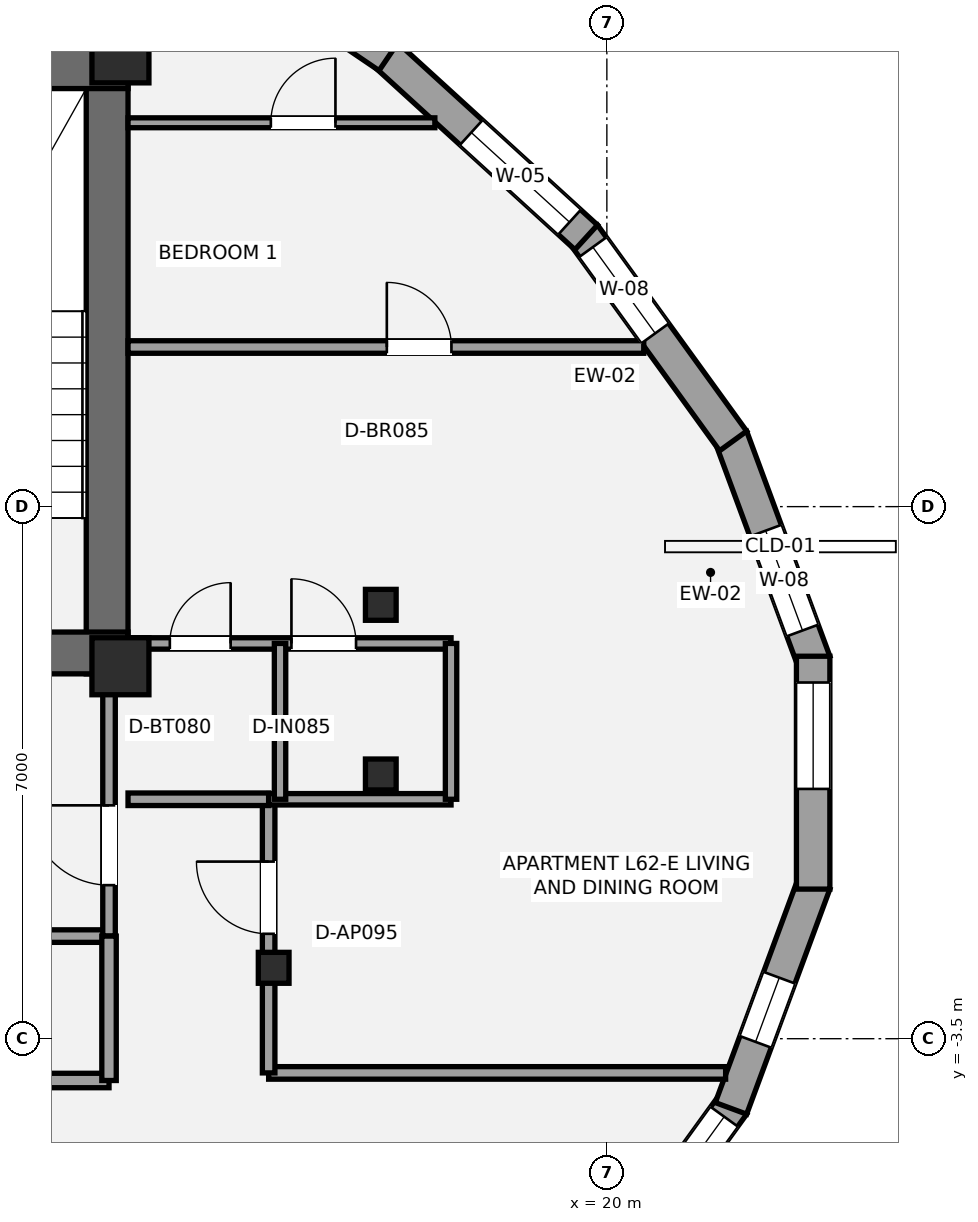
"""IFC4 building model, lengths in metres.
Left out: names, types, materials, properties, quantities, classifications, styles, units other than length and angle.
Written with IfcOpenShell. Run it as: python <this file> out.ifc"""

import sys

from ifc_helpers import new_model, si_unit, direction, frame, frame_2d, origin, origin_2d, place, context, subcontext, project, spatial, rectangle, i_section, extrude, element, fill, save


model = new_model("IFC4")
c1 = context("Model", 3, precision=1e-05, world=origin(), true_north=direction((0.0, 1.0)))
c2 = subcontext(c1, "Body", "Model", "MODEL_VIEW")
j1 = project(units=[si_unit("LENGTHUNIT", "METRE"), si_unit("PLANEANGLEUNIT", "RADIAN")], contexts=[c1])
p1 = place(None, origin())
s1 = spatial("IfcSite", under=j1, at=p1, CompositionType="ELEMENT")
p2 = place(p1, origin())
s2 = spatial("IfcBuilding", under=s1, at=p2, CompositionType="ELEMENT")
p3 = place(p2, frame((0.0, 0.0, 222.6)))
s3 = spatial("IfcBuildingStorey", under=s2, at=p3, CompositionType="ELEMENT", Elevation=222.6)
p4 = place(p3, frame((13.425, 1.3, 0.0), z_axis=(0.0, 0.0, 1.0), x_axis=(0.0, 1.0, 0.0)))
e1 = element("IfcWall", 1, at=p4, inside=s3, PredefinedType="SHEAR", context=c2, shape_type="SweptSolid", body=[
    extrude(rectangle(XDim=8.25, YDim=0.55, at=frame_2d((4.125, 0.0))), origin(), (0.0, 0.0, 1.0), 3.15),
])
p5 = place(p3, frame((4.525, 9.275, 0.0), z_axis=(0.0, 0.0, 1.0), x_axis=(1.0, 0.0, 0.0)))
e2 = element("IfcWall", 2, at=p5, inside=s3, PredefinedType="SHEAR", context=c2, shape_type="SweptSolid", body=[
    extrude(rectangle(XDim=9.175, YDim=0.55, at=frame_2d((4.587, 0.0))), origin(), (0.0, 0.0, 1.0), 3.15),
])
p6 = place(p3, frame((13.7, 1.575, 0.0), z_axis=(0.0, 0.0, 1.0), x_axis=(-1.0, 0.0, 0.0)))
e3 = element("IfcWall", 3, at=p6, inside=s3, PredefinedType="SHEAR", context=c2, shape_type="SweptSolid", body=[
    extrude(rectangle(XDim=8.775, YDim=0.55, at=frame_2d((4.387, 0.0))), origin(), (0.0, 0.0, 1.0), 3.15),
])
p7 = place(p6, frame((2.35, 0.0, 0.0)))
e4 = element("IfcOpeningElement", 4, at=p7, cuts=e3, PredefinedType="OPENING", context=c2, shape_type="SweptSolid", body=[
    extrude(rectangle(XDim=1.05, YDim=2.15, at=frame_2d((0.525, 1.075))), frame((0.0, 0.285, 0.0), z_axis=(0.0, -1.0, 0.0), x_axis=(1.0, 0.0, 0.0)), (0.0, 0.0, 1.0), 0.57),
])
p8 = place(p6, frame((4.35, 0.0, 0.0)))
e5 = element("IfcOpeningElement", 5, at=p8, cuts=e3, PredefinedType="OPENING", context=c2, shape_type="SweptSolid", body=[
    extrude(rectangle(XDim=1.1, YDim=2.2, at=frame_2d((0.55, 1.1))), frame((0.0, 0.285, 0.0), z_axis=(0.0, -1.0, 0.0), x_axis=(1.0, 0.0, 0.0)), (0.0, 0.0, 1.0), 0.57),
])
for number, where, z_axis, x_axis in (
    (6, (13.6, 1.4, 0.0), (0.0, 0.0, 1.0), (1.0, 0.0, 0.0)),
    (7, (13.6, 9.45, 0.0), (0.0, 0.0, 1.0), (1.0, 0.0, 0.0)),
):
    element("IfcColumn", number, at=place(p3, frame(where, z_axis=z_axis, x_axis=x_axis)), inside=s3, PredefinedType="PILASTER", context=c2, shape_type="SweptSolid", body=[
        extrude(rectangle(XDim=0.75, YDim=0.75, at=origin_2d()), origin(), (0.0, 0.0, 1.0), 3.15),
    ])
for number, where, z_axis, x_axis in (
    (8, (17.026, 2.208, 0.0), (0.0, 0.0, 1.0), (1.0, 0.0, 0.0)),
    (9, (15.616, -2.567, 0.0), (0.0, 0.0, 1.0), (1.0, 0.0, 0.0)),
    (10, (17.026, -0.024, 0.0), (0.0, 0.0, 1.0), (1.0, 0.0, 0.0)),
):
    element("IfcColumn", number, at=place(p3, frame(where, z_axis=z_axis, x_axis=x_axis)), inside=s3, PredefinedType="COLUMN", context=c2, shape_type="SweptSolid", body=[
        extrude(i_section(OverallWidth=0.404, OverallDepth=0.407, WebThickness=0.027, FlangeThickness=0.044, at=origin_2d()), origin(), (0.0, 0.0, 1.0), 3.15),
    ])
p9 = place(p3, frame((21.633, 4.417, 0.0), z_axis=(0.0, 0.0, 1.0), x_axis=(0.346755155412, -0.937955682426, 0.0)))
e11 = element("IfcWall", 11, at=p9, inside=s3, PredefinedType="STANDARD", context=c2, shape_type="SweptSolid", body=[
    extrude(rectangle(XDim=3.157, YDim=0.44, at=frame_2d((1.579, 0.0))), origin(), (0.0, 0.0, 1.0), 2.336),
])
p10 = place(p9, frame((1.315, 0.0, 0.55)))
e12 = element("IfcOpeningElement", 12, at=p10, cuts=e11, PredefinedType="OPENING", context=c2, shape_type="SweptSolid", body=[
    extrude(rectangle(XDim=1.4, YDim=1.55, at=frame_2d((0.7, 0.775))), frame((0.0, 0.23, 0.0), z_axis=(0.0, -1.0, 0.0), x_axis=(1.0, 0.0, 0.0)), (0.0, 0.0, 1.0), 0.46),
])
p11 = place(p3, frame((19.698, 7.076, 0.0), z_axis=(0.0, 0.0, 1.0), x_axis=(0.586344849721, -0.810061551492, 0.0)))
e13 = element("IfcWall", 13, at=p11, inside=s3, PredefinedType="STANDARD", context=c2, shape_type="SweptSolid", body=[
    extrude(rectangle(XDim=3.348, YDim=0.44, at=frame_2d((1.674, 0.0))), origin(), (0.0, 0.0, 1.0), 2.336),
])
p12 = place(p11, frame((0.2, 0.0, 0.58)))
e14 = element("IfcOpeningElement", 14, at=p12, cuts=e13, PredefinedType="OPENING", context=c2, shape_type="SweptSolid", body=[
    extrude(rectangle(XDim=1.4, YDim=1.55, at=frame_2d((0.7, 0.775))), frame((0.0, 0.23, 0.0), z_axis=(0.0, -1.0, 0.0), x_axis=(1.0, 0.0, 0.0)), (0.0, 0.0, 1.0), 0.46),
])
p13 = place(p3, frame((17.101, 9.438, 0.0), z_axis=(0.0, 0.0, 1.0), x_axis=(0.738907573949, -0.673806795129, 0.0)))
e15 = element("IfcWall", 15, at=p13, inside=s3, PredefinedType="STANDARD", context=c2, shape_type="SweptSolid", body=[
    extrude(rectangle(XDim=3.555, YDim=0.44, at=frame_2d((1.778, 0.0))), origin(), (0.0, 0.0, 1.0), 2.336),
])
p14 = place(p13, frame((1.508, 0.0, 0.55)))
e16 = element("IfcOpeningElement", 16, at=p14, cuts=e15, PredefinedType="OPENING", context=c2, shape_type="SweptSolid", body=[
    extrude(rectangle(XDim=1.75, YDim=1.55, at=frame_2d((0.875, 0.775))), frame((0.0, 0.23, 0.0), z_axis=(0.0, -1.0, 0.0), x_axis=(1.0, 0.0, 0.0)), (0.0, 0.0, 1.0), 0.46),
])
p15 = place(p3, frame((14.033, 11.516, 0.0), z_axis=(0.0, 0.0, 1.0), x_axis=(0.827642668093, -0.561255391023, 0.0)))
e17 = element("IfcWall", 17, at=p15, inside=s3, PredefinedType="STANDARD", context=c2, shape_type="SweptSolid", body=[
    extrude(rectangle(XDim=3.738, YDim=0.44, at=frame_2d((1.869, 0.0))), origin(), (0.0, 0.0, 1.0), 2.336),
])
p16 = place(p15, frame((0.498, 0.0, 0.55)))
e18 = element("IfcOpeningElement", 18, at=p16, cuts=e17, PredefinedType="OPENING", context=c2, shape_type="SweptSolid", body=[
    extrude(rectangle(XDim=1.75, YDim=1.55, at=frame_2d((0.875, 0.775))), frame((0.0, 0.23, 0.0), z_axis=(0.0, -1.0, 0.0), x_axis=(1.0, 0.0, 0.0)), (0.0, 0.0, 1.0), 0.46),
])
p17 = place(p3, frame((21.661, -4.364, 0.0), z_axis=(0.0, 0.0, 1.0), x_axis=(-0.586344849721, -0.810061551492, 0.0)))
e19 = element("IfcWall", 19, at=p17, inside=s3, PredefinedType="STANDARD", context=c2, shape_type="SweptSolid", body=[
    extrude(rectangle(XDim=3.348, YDim=0.44, at=frame_2d((1.674, 0.0))), origin(), (0.0, 0.0, 1.0), 2.336),
])
p18 = place(p17, frame((0.2, 0.0, 0.55)))
e20 = element("IfcOpeningElement", 20, at=p18, cuts=e19, PredefinedType="OPENING", context=c2, shape_type="SweptSolid", body=[
    extrude(rectangle(XDim=1.75, YDim=1.55, at=frame_2d((0.875, 0.775))), frame((0.0, 0.23, 0.0), z_axis=(0.0, -1.0, 0.0), x_axis=(1.0, 0.0, 0.0)), (0.0, 0.0, 1.0), 0.46),
])
p19 = place(p3, frame((22.728, -1.456, 0.0), z_axis=(0.0, 0.0, 1.0), x_axis=(-0.346755155412, -0.937955682426, 0.0)))
e21 = element("IfcWall", 21, at=p19, inside=s3, PredefinedType="STANDARD", context=c2, shape_type="SweptSolid", body=[
    extrude(rectangle(XDim=3.157, YDim=0.44, at=frame_2d((1.579, 0.0))), origin(), (0.0, 0.0, 1.0), 2.336),
])
p20 = place(p19, frame((1.324, 0.0, 0.58)))
e22 = element("IfcOpeningElement", 22, at=p20, cuts=e21, PredefinedType="OPENING", context=c2, shape_type="SweptSolid", body=[
    extrude(rectangle(XDim=0.9, YDim=1.35, at=frame_2d((0.45, 0.675))), frame((0.0, 0.23, 0.0), z_axis=(0.0, -1.0, 0.0), x_axis=(1.0, 0.0, 0.0)), (0.0, 0.0, 1.0), 0.46),
])
p21 = place(p3, frame((22.714, 1.532, 0.0), z_axis=(0.0, 0.0, 1.0), x_axis=(0.0, -1.0, 0.0)))
e23 = element("IfcWall", 23, at=p21, inside=s3, PredefinedType="STANDARD", context=c2, shape_type="SweptSolid", body=[
    extrude(rectangle(XDim=3.064, YDim=0.44, at=frame_2d((1.532, 0.0))), origin(), (0.0, 0.0, 1.0), 2.336),
])
p22 = place(p21, frame((0.346, 0.0, 0.58)))
e24 = element("IfcOpeningElement", 24, at=p22, cuts=e23, PredefinedType="OPENING", context=c2, shape_type="SweptSolid", body=[
    extrude(rectangle(XDim=1.4, YDim=1.55, at=frame_2d((0.7, 0.775))), frame((0.0, 0.23, 0.0), z_axis=(0.0, -1.0, 0.0), x_axis=(1.0, 0.0, 0.0)), (0.0, 0.0, 1.0), 0.46),
])
p23 = place(p3, frame((7.2, -2.15, 0.0), z_axis=(0.0, 0.0, 1.0), x_axis=(1.0, 0.0, 0.0)))
e25 = element("IfcWall", 25, at=p23, inside=s3, PredefinedType="PARTITIONING", context=c2, shape_type="SweptSolid", body=[
    extrude(rectangle(XDim=6.25, YDim=0.165, at=frame_2d((3.125, 0.0))), origin(), (0.0, 0.0, 1.0), 2.97),
])
p24 = place(p3, frame((13.45, -2.15, 0.0), z_axis=(0.0, 0.0, 1.0), x_axis=(0.0, 1.0, 0.0)))
e26 = element("IfcWall", 26, at=p24, inside=s3, PredefinedType="PARTITIONING", context=c2, shape_type="SweptSolid", body=[
    extrude(rectangle(XDim=3.5, YDim=0.165, at=frame_2d((1.75, 0.0))), origin(), (0.0, 0.0, 1.0), 2.423),
])
p25 = place(p24, frame((0.67, 0.0, 0.0)))
e27 = element("IfcOpeningElement", 27, at=p25, cuts=e26, PredefinedType="OPENING", context=c2, shape_type="SweptSolid", body=[
    extrude(rectangle(XDim=1.05, YDim=2.15, at=frame_2d((0.525, 1.075))), frame((0.0, 0.093, 0.0), z_axis=(0.0, -1.0, 0.0), x_axis=(1.0, 0.0, 0.0)), (0.0, 0.0, 1.0), 0.185),
])
p26 = place(p3, frame((2.1, -4.05, 0.0), z_axis=(0.0, 0.0, 1.0), x_axis=(1.0, 0.0, 0.0)))
e28 = element("IfcWall", 28, at=p26, inside=s3, PredefinedType="PLUMBINGWALL", context=c2, shape_type="SweptSolid", body=[
    extrude(rectangle(XDim=11.35, YDim=0.19, at=frame_2d((5.675, 0.0))), origin(), (0.0, 0.0, 1.0), 2.357),
])
p27 = place(p26, frame((5.2, 0.0, 0.0)))
e29 = element("IfcOpeningElement", 29, at=p27, cuts=e28, PredefinedType="OPENING", context=c2, shape_type="SweptSolid", body=[
    extrude(rectangle(XDim=0.9, YDim=2.1, at=frame_2d((0.45, 1.05))), frame((0.0, 0.105, 0.0), z_axis=(0.0, -1.0, 0.0), x_axis=(1.0, 0.0, 0.0)), (0.0, 0.0, 1.0), 0.21),
])
p28 = place(p3, frame((13.45, -4.05, 0.0), z_axis=(0.0, 0.0, 1.0), x_axis=(0.0, 1.0, 0.0)))
e30 = element("IfcWall", 30, at=p28, inside=s3, PredefinedType="PLUMBINGWALL", context=c2, shape_type="SweptSolid", body=[
    extrude(rectangle(XDim=1.9, YDim=0.19, at=frame_2d((0.95, 0.0))), origin(), (0.0, 0.0, 1.0), 2.423),
])
p29 = place(p3, frame((15.55, -3.95, 0.0), z_axis=(0.0, 0.0, 1.0), x_axis=(1.0, 0.0, 0.0)))
e31 = element("IfcWall", 31, at=p29, inside=s3, PredefinedType="PARTITIONING", context=c2, shape_type="SweptSolid", body=[
    extrude(rectangle(XDim=6.012, YDim=0.165, at=frame_2d((3.006, 0.0))), origin(), (0.0, 0.0, 1.0), 2.423),
])
p30 = place(p3, frame((15.55, -3.95, 0.0), z_axis=(0.0, 0.0, 1.0), x_axis=(0.0, 1.0, 0.0)))
e32 = element("IfcWall", 32, at=p30, inside=s3, PredefinedType="PARTITIONING", context=c2, shape_type="SweptSolid", body=[
    extrude(rectangle(XDim=3.6, YDim=0.165, at=frame_2d((1.8, 0.0))), origin(), (0.0, 0.0, 1.0), 2.357),
])
p31 = place(p30, frame((1.83, 0.0, 0.0)))
e33 = element("IfcOpeningElement", 33, at=p31, cuts=e32, PredefinedType="OPENING", context=c2, shape_type="SweptSolid", body=[
    extrude(rectangle(XDim=0.95, YDim=2.15, at=frame_2d((0.475, 1.075))), frame((0.0, 0.093, 0.0), z_axis=(0.0, -1.0, 0.0), x_axis=(1.0, 0.0, 0.0)), (0.0, 0.0, 1.0), 0.185),
])
p32 = place(p3, frame((13.7, -0.35, 0.0), z_axis=(0.0, 0.0, 1.0), x_axis=(1.0, 0.0, 0.0)))
e34 = element("IfcWall", 34, at=p32, inside=s3, PredefinedType="PARTITIONING", context=c2, shape_type="SweptSolid", body=[
    extrude(rectangle(XDim=1.85, YDim=0.165, at=frame_2d((0.925, 0.0))), origin(), (0.0, 0.0, 1.0), 2.423),
])
p33 = place(p3, frame((13.7, 5.6, 0.0), z_axis=(0.0, 0.0, 1.0), x_axis=(1.0, 0.0, 0.0)))
e35 = element("IfcWall", 35, at=p33, inside=s3, PredefinedType="PARTITIONING", context=c2, shape_type="SweptSolid", body=[
    extrude(rectangle(XDim=6.785, YDim=0.165, at=frame_2d((3.393, 0.0))), origin(), (0.0, 0.0, 1.0), 2.423),
])
p34 = place(p33, frame((3.405, 0.0, 0.0)))
e36 = element("IfcOpeningElement", 36, at=p34, cuts=e35, PredefinedType="OPENING", context=c2, shape_type="SweptSolid", body=[
    extrude(rectangle(XDim=0.85, YDim=2.1, at=frame_2d((0.425, 1.05))), frame((0.0, 0.093, 0.0), z_axis=(0.0, -1.0, 0.0), x_axis=(1.0, 0.0, 0.0)), (0.0, 0.0, 1.0), 0.185),
])
p35 = place(p3, frame((13.7, 1.7, 0.0), z_axis=(0.0, 0.0, 1.0), x_axis=(1.0, 0.0, 0.0)))
e37 = element("IfcWall", 37, at=p35, inside=s3, PredefinedType="PLUMBINGWALL", context=c2, shape_type="SweptSolid", body=[
    extrude(rectangle(XDim=4.25, YDim=0.15, at=frame_2d((2.125, 0.0))), origin(), (0.0, 0.0, 1.0), 2.423),
])
p36 = place(p35, frame((0.55, 0.0, 0.0)))
e38 = element("IfcOpeningElement", 38, at=p36, cuts=e37, PredefinedType="OPENING", context=c2, shape_type="SweptSolid", body=[
    extrude(rectangle(XDim=0.8, YDim=2.1, at=frame_2d((0.4, 1.05))), frame((0.0, 0.085, 0.0), z_axis=(0.0, -1.0, 0.0), x_axis=(1.0, 0.0, 0.0)), (0.0, 0.0, 1.0), 0.17),
])
p37 = place(p35, frame((2.15, 0.0, 0.0)))
e39 = element("IfcOpeningElement", 39, at=p37, cuts=e37, PredefinedType="OPENING", context=c2, shape_type="SweptSolid", body=[
    extrude(rectangle(XDim=0.85, YDim=2.1, at=frame_2d((0.425, 1.05))), frame((0.0, 0.085, 0.0), z_axis=(0.0, -1.0, 0.0), x_axis=(1.0, 0.0, 0.0)), (0.0, 0.0, 1.0), 0.17),
])
p38 = place(p3, frame((15.55, -0.35, 0.0), z_axis=(0.0, 0.0, 1.0), x_axis=(1.0, 0.0, 0.0)))
e40 = element("IfcWall", 40, at=p38, inside=s3, PredefinedType="PLUMBINGWALL", context=c2, shape_type="SweptSolid", body=[
    extrude(rectangle(XDim=2.4, YDim=0.15, at=frame_2d((1.2, 0.0))), origin(), (0.0, 0.0, 1.0), 2.423),
])
p39 = place(p3, frame((15.7, -0.35, 0.0), z_axis=(0.0, 0.0, 1.0), x_axis=(0.0, 1.0, 0.0)))
e41 = element("IfcWall", 41, at=p39, inside=s3, PredefinedType="PLUMBINGWALL", context=c2, shape_type="SweptSolid", body=[
    extrude(rectangle(XDim=2.05, YDim=0.15, at=frame_2d((1.025, 0.0))), origin(), (0.0, 0.0, 1.0), 2.97),
])
p40 = place(p3, frame((17.95, -0.35, 0.0), z_axis=(0.0, 0.0, 1.0), x_axis=(0.0, 1.0, 0.0)))
e42 = element("IfcWall", 42, at=p40, inside=s3, PredefinedType="PLUMBINGWALL", context=c2, shape_type="SweptSolid", body=[
    extrude(rectangle(XDim=2.05, YDim=0.15, at=frame_2d((1.025, 0.0))), origin(), (0.0, 0.0, 1.0), 2.423),
])
p41 = place(p3, frame((13.7, 8.55, 0.0), z_axis=(0.0, 0.0, 1.0), x_axis=(1.0, 0.0, 0.0)))
e43 = element("IfcWall", 43, at=p41, inside=s3, PredefinedType="PARTITIONING", context=c2, shape_type="SweptSolid", body=[
    extrude(rectangle(XDim=4.037, YDim=0.13, at=frame_2d((2.019, 0.0))), origin(), (0.0, 0.0, 1.0), 2.423),
])
p42 = place(p41, frame((1.879, 0.0, 0.0)))
e44 = element("IfcOpeningElement", 44, at=p42, cuts=e43, PredefinedType="OPENING", context=c2, shape_type="SweptSolid", body=[
    extrude(rectangle(XDim=0.85, YDim=2.1, at=frame_2d((0.425, 1.05))), frame((0.0, 0.075, 0.0), z_axis=(0.0, -1.0, 0.0), x_axis=(1.0, 0.0, 0.0)), (0.0, 0.0, 1.0), 0.15),
])
p43 = place(p10, origin())
e45 = element("IfcWindow", 45, at=p43, inside=s3, PartitioningType="SINGLE_PANEL", PredefinedType="WINDOW", context=c2, shape_type="SweptSolid", body=[
    extrude(rectangle(XDim=1.4, YDim=1.55, at=frame_2d((0.7, 0.775))), frame((0.0, -0.01, 0.0), z_axis=(0.0, -1.0, 0.0), x_axis=(1.0, 0.0, 0.0)), (0.0, 0.0, 1.0), 0.06),
])
fill(e12, e45)
p44 = place(p12, origin())
e46 = element("IfcWindow", 46, at=p44, inside=s3, PartitioningType="SINGLE_PANEL", PredefinedType="WINDOW", context=c2, shape_type="SweptSolid", body=[
    extrude(rectangle(XDim=1.4, YDim=1.55, at=frame_2d((0.7, 0.775))), frame((0.0, -0.01, 0.0), z_axis=(0.0, -1.0, 0.0), x_axis=(1.0, 0.0, 0.0)), (0.0, 0.0, 1.0), 0.06),
])
fill(e14, e46)
p45 = place(p14, origin())
e47 = element("IfcWindow", 47, at=p45, inside=s3, PartitioningType="SINGLE_PANEL", PredefinedType="WINDOW", context=c2, shape_type="SweptSolid", body=[
    extrude(rectangle(XDim=1.75, YDim=1.55, at=frame_2d((0.875, 0.775))), frame((0.0, -0.01, 0.0), z_axis=(0.0, -1.0, 0.0), x_axis=(1.0, 0.0, 0.0)), (0.0, 0.0, 1.0), 0.06),
])
fill(e16, e47)
p46 = place(p18, origin())
e48 = element("IfcWindow", 48, at=p46, inside=s3, PartitioningType="SINGLE_PANEL", PredefinedType="WINDOW", context=c2, shape_type="SweptSolid", body=[
    extrude(rectangle(XDim=1.75, YDim=1.55, at=frame_2d((0.875, 0.775))), frame((0.0, -0.01, 0.0), z_axis=(0.0, -1.0, 0.0), x_axis=(1.0, 0.0, 0.0)), (0.0, 0.0, 1.0), 0.06),
])
fill(e20, e48)
p47 = place(p20, origin())
e49 = element("IfcWindow", 49, at=p47, inside=s3, PartitioningType="SINGLE_PANEL", PredefinedType="WINDOW", context=c2, shape_type="SweptSolid", body=[
    extrude(rectangle(XDim=0.9, YDim=1.35, at=frame_2d((0.45, 0.675))), frame((0.0, -0.01, 0.0), z_axis=(0.0, -1.0, 0.0), x_axis=(1.0, 0.0, 0.0)), (0.0, 0.0, 1.0), 0.06),
])
fill(e22, e49)
p48 = place(p22, origin())
e50 = element("IfcWindow", 50, at=p48, inside=s3, PartitioningType="SINGLE_PANEL", PredefinedType="WINDOW", context=c2, shape_type="SweptSolid", body=[
    extrude(rectangle(XDim=1.4, YDim=1.55, at=frame_2d((0.7, 0.775))), frame((0.0, -0.01, 0.0), z_axis=(0.0, -1.0, 0.0), x_axis=(1.0, 0.0, 0.0)), (0.0, 0.0, 1.0), 0.06),
])
fill(e24, e50)
p49 = place(p25, origin())
e51 = element("IfcDoor", 51, at=p49, inside=s3, OperationType="SINGLE_SWING_RIGHT", PredefinedType="DOOR", context=c2, shape_type="SweptSolid", body=[
    extrude(rectangle(XDim=1.05, YDim=2.15, at=frame_2d((0.525, 1.075))), frame((0.0, 0.025, 0.0), z_axis=(0.0, -1.0, 0.0), x_axis=(1.0, 0.0, 0.0)), (0.0, 0.0, 1.0), 0.05),
])
fill(e27, e51)
p50 = place(p31, origin())
e52 = element("IfcDoor", 52, at=p50, inside=s3, OperationType="SINGLE_SWING_RIGHT", PredefinedType="DOOR", context=c2, shape_type="SweptSolid", body=[
    extrude(rectangle(XDim=0.95, YDim=2.15, at=frame_2d((0.475, 1.075))), frame((0.0, 0.025, 0.0), z_axis=(0.0, -1.0, 0.0), x_axis=(1.0, 0.0, 0.0)), (0.0, 0.0, 1.0), 0.05),
])
fill(e33, e52)
p51 = place(p36, origin())
e53 = element("IfcDoor", 53, at=p51, inside=s3, OperationType="SINGLE_SWING_RIGHT", PredefinedType="DOOR", context=c2, shape_type="SweptSolid", body=[
    extrude(rectangle(XDim=0.8, YDim=2.1, at=frame_2d((0.4, 1.05))), frame((0.0, 0.025, 0.0), z_axis=(0.0, -1.0, 0.0), x_axis=(1.0, 0.0, 0.0)), (0.0, 0.0, 1.0), 0.05),
])
fill(e38, e53)
p52 = place(p37, origin())
e54 = element("IfcDoor", 54, at=p52, inside=s3, OperationType="SINGLE_SWING_LEFT", PredefinedType="DOOR", context=c2, shape_type="SweptSolid", body=[
    extrude(rectangle(XDim=0.85, YDim=2.1, at=frame_2d((0.425, 1.05))), frame((0.0, 0.025, 0.0), z_axis=(0.0, -1.0, 0.0), x_axis=(1.0, 0.0, 0.0)), (0.0, 0.0, 1.0), 0.05),
])
fill(e39, e54)
p53 = place(p34, origin())
e55 = element("IfcDoor", 55, at=p53, inside=s3, OperationType="SINGLE_SWING_LEFT", PredefinedType="DOOR", context=c2, shape_type="SweptSolid", body=[
    extrude(rectangle(XDim=0.85, YDim=2.1, at=frame_2d((0.425, 1.05))), frame((0.0, 0.025, 0.0), z_axis=(0.0, -1.0, 0.0), x_axis=(1.0, 0.0, 0.0)), (0.0, 0.0, 1.0), 0.05),
])
fill(e36, e55)
p54 = place(p42, origin())
e56 = element("IfcDoor", 56, at=p54, inside=s3, OperationType="SINGLE_SWING_RIGHT", PredefinedType="DOOR", context=c2, shape_type="SweptSolid", body=[
    extrude(rectangle(XDim=0.85, YDim=2.1, at=frame_2d((0.425, 1.05))), frame((0.0, 0.025, 0.0), z_axis=(0.0, -1.0, 0.0), x_axis=(1.0, 0.0, 0.0)), (0.0, 0.0, 1.0), 0.05),
])
fill(e44, e56)
save(model, sys.argv[1])
